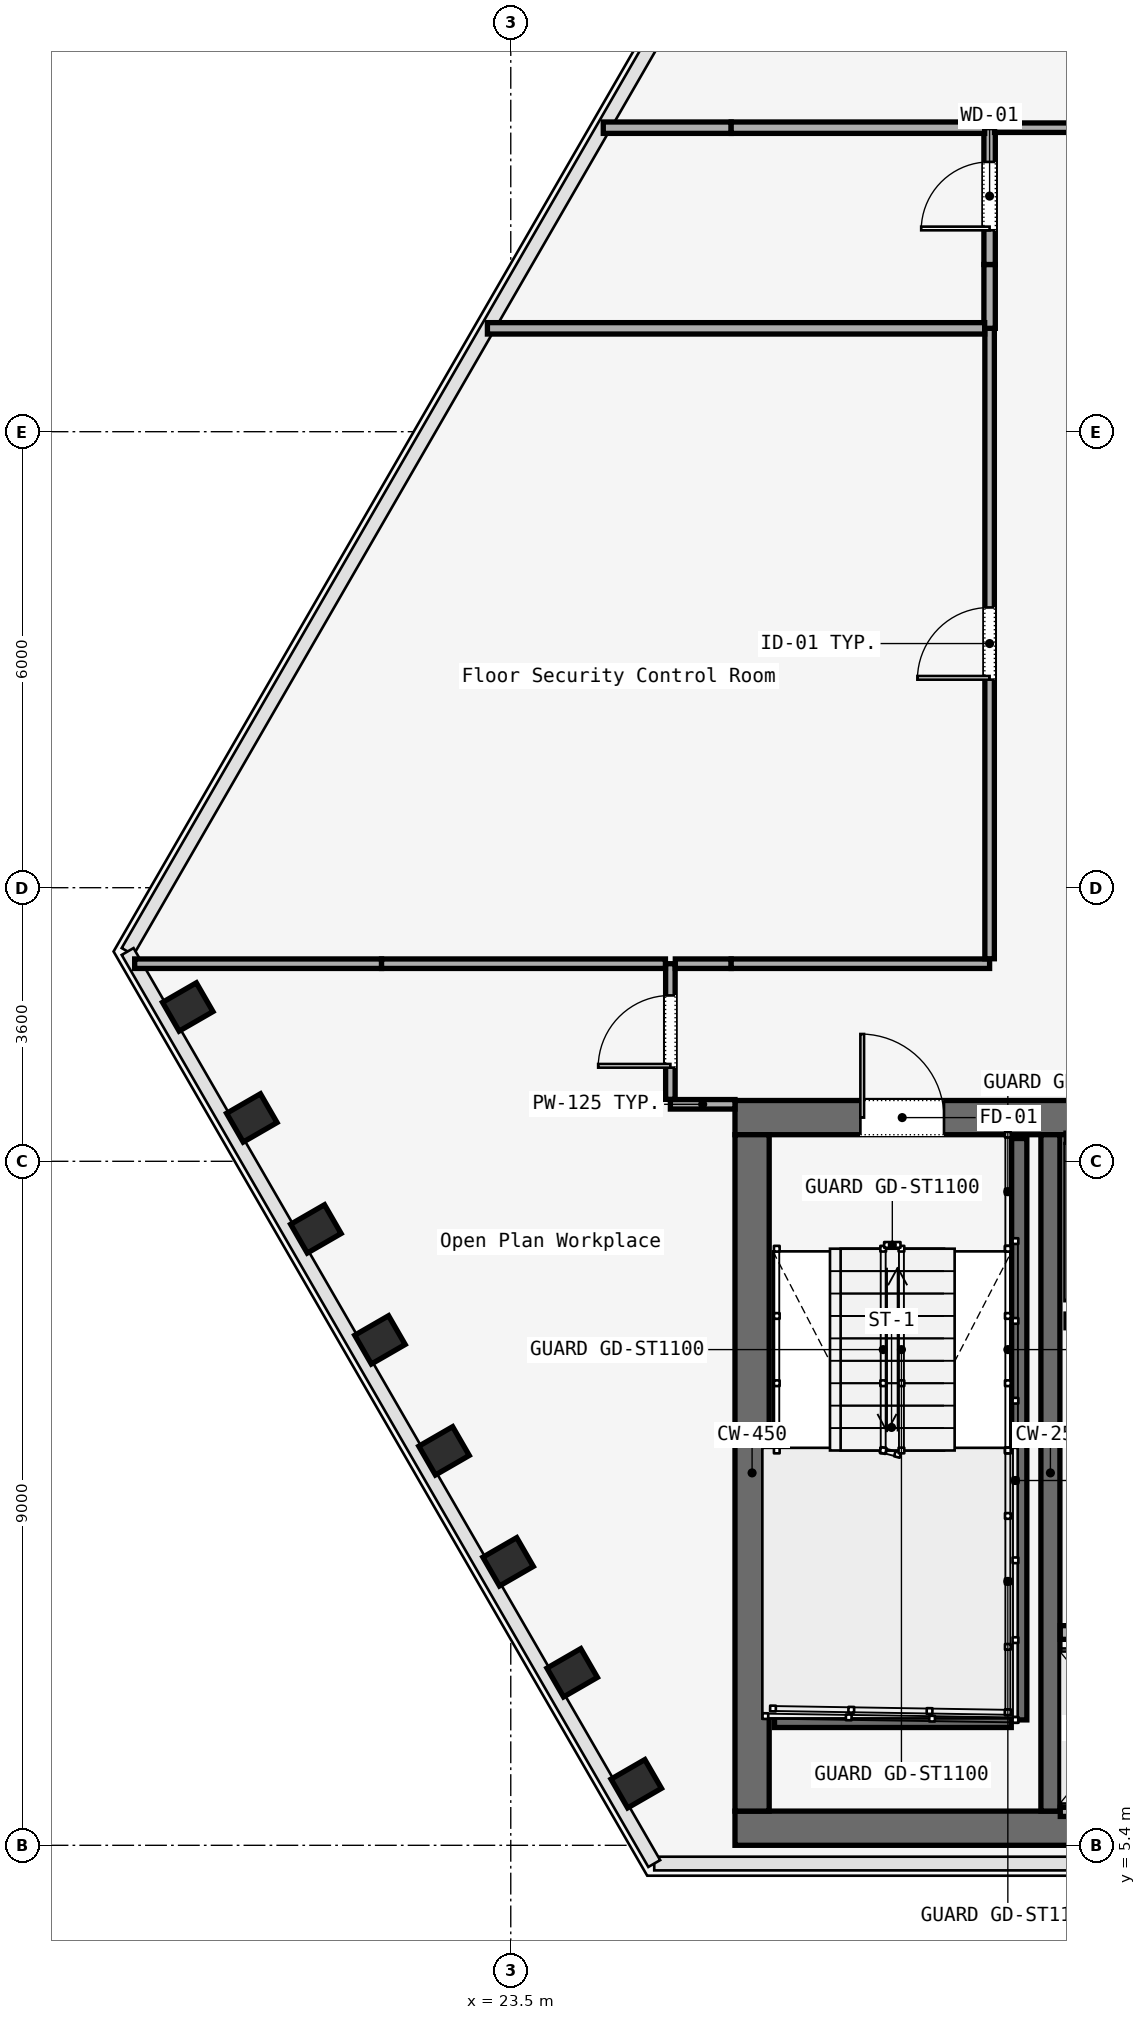
"""IFC4 building model, lengths in metres.
Left out: names, types, materials, properties, quantities, classifications, styles, units other than length and angle.
Written with IfcOpenShell. Run it as: python <this file> out.ifc"""

import sys

from ifc_helpers import new_model, si_unit, direction, frame, frame_2d, origin, origin_2d, place, context, subcontext, project, spatial, rectangle, i_section, extrude, element, fill, save


model = new_model("IFC4")
c1 = context("Model", 3, precision=1e-05, world=origin(), true_north=direction((0.0, 1.0)))
c2 = subcontext(c1, "Body", "Model", "MODEL_VIEW")
j1 = project(units=[si_unit("LENGTHUNIT", "METRE"), si_unit("PLANEANGLEUNIT", "RADIAN")], contexts=[c1])
p1 = place(None, origin())
s1 = spatial("IfcSite", under=j1, at=p1, CompositionType="ELEMENT")
p2 = place(p1, origin())
s2 = spatial("IfcBuilding", under=s1, at=p2, CompositionType="ELEMENT")
p3 = place(p2, frame((0.0, 0.0, 93.0)))
s3 = spatial("IfcBuildingStorey", under=s2, at=p3, CompositionType="ELEMENT", Elevation=93.0)
p4 = place(p3, frame((26.45, 14.975, 0.0), z_axis=(0.0, 0.0, 1.0), x_axis=(1.0, 0.0, 0.0)))
e1 = element("IfcWall", 1, at=p4, inside=s3, PredefinedType="SOLIDWALL", context=c2, shape_type="SweptSolid", body=[
    extrude(rectangle(XDim=31.1, YDim=0.45, at=frame_2d((15.55, 0.0))), origin(), (0.0, 0.0, 1.0), 3.58),
])
p5 = place(p4, frame((1.65, 0.0, 0.0)))
e2 = element("IfcOpeningElement", 2, at=p5, cuts=e1, PredefinedType="OPENING", context=c2, shape_type="SweptSolid", body=[
    extrude(rectangle(XDim=1.1, YDim=2.2, at=frame_2d((0.55, 1.1))), frame((0.0, 0.225, 0.0), z_axis=(0.0, -1.0, 0.0), x_axis=(1.0, 0.0, 0.0)), (0.0, 0.0, 1.0), 0.45),
])
p6 = place(p4, frame((13.65, 0.0, 0.0)))
e3 = element("IfcOpeningElement", 3, at=p6, cuts=e1, PredefinedType="OPENING", context=c2, shape_type="SweptSolid", body=[
    extrude(rectangle(XDim=1.1, YDim=2.2, at=frame_2d((0.55, 1.1))), frame((0.0, 0.225, 0.0), z_axis=(0.0, -1.0, 0.0), x_axis=(1.0, 0.0, 0.0)), (0.0, 0.0, 1.0), 0.45),
])
p7 = place(p4, frame((25.55, 0.0, 0.0)))
e4 = element("IfcOpeningElement", 4, at=p7, cuts=e1, PredefinedType="OPENING", context=c2, shape_type="SweptSolid", body=[
    extrude(rectangle(XDim=1.1, YDim=2.2, at=frame_2d((0.55, 1.1))), frame((0.0, 0.225, 0.0), z_axis=(0.0, -1.0, 0.0), x_axis=(1.0, 0.0, 0.0)), (0.0, 0.0, 1.0), 0.45),
])
p8 = place(p4, frame((10.7, 0.0, 0.0)))
e5 = element("IfcOpeningElement", 5, at=p8, cuts=e1, PredefinedType="OPENING", context=c2, shape_type="SweptSolid", body=[
    extrude(rectangle(XDim=1.4, YDim=2.2, at=frame_2d((0.7, 1.1))), frame((0.0, 0.225, 0.0), z_axis=(0.0, -1.0, 0.0), x_axis=(1.0, 0.0, 0.0)), (0.0, 0.0, 1.0), 0.45),
])
p9 = place(p4, frame((19.35, 0.0, 0.0)))
e6 = element("IfcOpeningElement", 6, at=p9, cuts=e1, PredefinedType="OPENING", context=c2, shape_type="SweptSolid", body=[
    extrude(rectangle(XDim=1.1, YDim=2.2, at=frame_2d((0.55, 1.1))), frame((0.0, 0.225, 0.0), z_axis=(0.0, -1.0, 0.0), x_axis=(1.0, 0.0, 0.0)), (0.0, 0.0, 1.0), 0.45),
])
p10 = place(p4, frame((21.4, 0.0, 0.0)))
e7 = element("IfcOpeningElement", 7, at=p10, cuts=e1, PredefinedType="OPENING", context=c2, shape_type="SweptSolid", body=[
    extrude(rectangle(XDim=0.9, YDim=2.1, at=frame_2d((0.45, 1.05))), frame((0.0, 0.225, 0.0), z_axis=(0.0, -1.0, 0.0), x_axis=(1.0, 0.0, 0.0)), (0.0, 0.0, 1.0), 0.45),
])
p11 = place(p4, frame((23.35, 0.0, 0.0)))
e8 = element("IfcOpeningElement", 8, at=p11, cuts=e1, PredefinedType="OPENING", context=c2, shape_type="SweptSolid", body=[
    extrude(rectangle(XDim=1.3, YDim=2.3, at=frame_2d((0.65, 1.15))), frame((0.0, 0.225, 0.0), z_axis=(0.0, -1.0, 0.0), x_axis=(1.0, 0.0, 0.0)), (0.0, 0.0, 1.0), 0.45),
])
p12 = place(p3, frame((26.45, 5.625, 0.0), z_axis=(0.0, 0.0, 1.0), x_axis=(1.0, 0.0, 0.0)))
e9 = element("IfcWall", 9, at=p12, inside=s3, PredefinedType="SOLIDWALL", context=c2, shape_type="SweptSolid", body=[
    extrude(rectangle(XDim=31.1, YDim=0.45, at=frame_2d((15.55, 0.0))), origin(), (0.0, 0.0, 1.0), 3.58),
])
p13 = place(p3, frame((26.675, 5.85, 0.0), z_axis=(0.0, 0.0, 1.0), x_axis=(0.0, 1.0, 0.0)))
e10 = element("IfcWall", 10, at=p13, inside=s3, PredefinedType="SOLIDWALL", context=c2, shape_type="SweptSolid", body=[
    extrude(rectangle(XDim=8.9, YDim=0.45, at=frame_2d((4.45, 0.0))), origin(), (0.0, 0.0, 1.0), 3.58),
])
p14 = place(p3, frame((30.6, 5.85, 0.0), z_axis=(0.0, 0.0, 1.0), x_axis=(0.0, 1.0, 0.0)))
e11 = element("IfcWall", 11, at=p14, inside=s3, PredefinedType="SOLIDWALL", context=c2, shape_type="SweptSolid", body=[
    extrude(rectangle(XDim=8.9, YDim=0.25, at=frame_2d((4.45, 0.0))), origin(), (0.0, 0.0, 1.0), 3.58),
])
for number, where, z_axis, x_axis in (
    (12, (19.25, 16.431, 0.0), (0.0, 0.0, 1.0), (-0.5, 0.866, 0.0)),
    (13, (20.093, 14.971, 0.0), (0.0, 0.0, 1.0), (-0.5, 0.866, 0.0)),
    (14, (20.936, 13.51, 0.0), (0.0, 0.0, 1.0), (-0.5, 0.866, 0.0)),
    (15, (21.779, 12.05, 0.0), (0.0, 0.0, 1.0), (-0.5, 0.866, 0.0)),
    (16, (22.622, 10.59, 0.0), (0.0, 0.0, 1.0), (-0.5, 0.866, 0.0)),
    (17, (23.465, 9.13, 0.0), (0.0, 0.0, 1.0), (-0.5, 0.866, 0.0)),
    (18, (24.308, 7.67, 0.0), (0.0, 0.0, 1.0), (-0.5, 0.866, 0.0)),
    (19, (25.151, 6.21, 0.0), (0.0, 0.0, 1.0), (-0.5, 0.866, 0.0)),
):
    element("IfcColumn", number, at=place(p3, frame(where, z_axis=z_axis, x_axis=x_axis)), inside=s3, PredefinedType="COLUMN", context=c2, shape_type="SweptSolid", body=[
        extrude(i_section(OverallWidth=0.437, OverallDepth=0.514, WebThickness=0.061, FlangeThickness=0.077, FilletRadius=0.015, at=origin_2d()), origin(), (0.0, 0.0, 1.0), 3.58),
    ])
p15 = place(p3, frame((30.19, 14.7, 0.0), z_axis=(0.0, 0.0, 1.0), x_axis=(0.0, -1.0, 0.0)))
e20 = element("IfcWall", 20, at=p15, inside=s3, PredefinedType="SOLIDWALL", context=c2, shape_type="SweptSolid", body=[
    extrude(rectangle(XDim=7.65, YDim=0.2, at=frame_2d((3.825, 0.0))), origin(), (0.0, 0.0, 1.0), 3.8),
])
p16 = place(p3, frame((26.97, 7.05, 0.0), z_axis=(0.0, 0.0, 1.0), x_axis=(1.0, 0.0, 0.0)))
e21 = element("IfcWall", 21, at=p16, inside=s3, PredefinedType="SOLIDWALL", context=c2, shape_type="SweptSolid", body=[
    extrude(rectangle(XDim=3.115, YDim=0.2, at=frame_2d((1.558, 0.0))), origin(), (0.0, 0.0, 1.0), 3.8),
])
p17 = place(p3, frame((30.73, 8.2, 0.0), z_axis=(0.0, 0.0, 1.0), x_axis=(1.0, 0.0, 0.0)))
e22 = element("IfcWall", 22, at=p17, inside=s3, PredefinedType="SOLIDWALL", context=c2, shape_type="SweptSolid", body=[
    extrude(rectangle(XDim=1.665, YDim=0.18, at=frame_2d((0.833, 0.0))), origin(), (0.0, 0.0, 1.0), 2.95),
])
p18 = place(p17, frame((0.282, 0.0, 0.0)))
e23 = element("IfcOpeningElement", 23, at=p18, cuts=e22, PredefinedType="OPENING", context=c2, shape_type="SweptSolid", body=[
    extrude(rectangle(XDim=1.1, YDim=2.2, at=frame_2d((0.55, 1.1))), frame((0.0, 0.09, 0.0), z_axis=(0.0, -1.0, 0.0), x_axis=(1.0, 0.0, 0.0)), (0.0, 0.0, 1.0), 0.18),
])
p19 = place(p3, frame((30.73, 5.84, 0.0), z_axis=(0.0, 0.0, 1.0), x_axis=(1.0, 0.0, 0.0)))
e24 = element("IfcWall", 24, at=p19, inside=s3, PredefinedType="SOLIDWALL", context=c2, shape_type="SweptSolid", body=[
    extrude(rectangle(XDim=1.665, YDim=0.12, at=frame_2d((0.833, 0.0))), origin(), (0.0, 0.0, 1.0), 2.95),
])
p20 = place(p3, frame((26.45, 15.15, 0.0), z_axis=(0.0, 0.0, 1.0), x_axis=(-1.0, 0.0, 0.0)))
e25 = element("IfcWall", 25, at=p20, inside=s3, PredefinedType="PARTITIONING", context=c2, shape_type="SweptSolid", body=[
    extrude(rectangle(XDim=0.85, YDim=0.125, at=frame_2d((0.425, 0.0))), origin(), (0.0, 0.0, 1.0), 2.95),
])
p21 = place(p3, frame((25.6, 15.215, 0.0), z_axis=(0.0, 0.0, 1.0), x_axis=(0.0, 1.0, 0.0)))
e26 = element("IfcWall", 26, at=p21, inside=s3, PredefinedType="PARTITIONING", context=c2, shape_type="SweptSolid", body=[
    extrude(rectangle(XDim=1.785, YDim=0.125, at=frame_2d((0.893, 0.0))), origin(), (0.0, 0.0, 1.0), 2.95),
])
p22 = place(p21, frame((0.417, 0.0, 0.0)))
e27 = element("IfcOpeningElement", 27, at=p22, cuts=e26, PredefinedType="OPENING", context=c2, shape_type="SweptSolid", body=[
    extrude(rectangle(XDim=0.95, YDim=2.2, at=frame_2d((0.475, 1.1))), frame((0.0, 0.062, 0.0), z_axis=(0.0, -1.0, 0.0), x_axis=(1.0, 0.0, 0.0)), (0.0, 0.0, 1.0), 0.125),
])
p23 = place(p3, frame((25.665, 17.0, 0.0), z_axis=(0.0, 0.0, 1.0), x_axis=(1.0, 0.0, 0.0)))
e28 = element("IfcWall", 28, at=p23, inside=s3, PredefinedType="PARTITIONING", context=c2, shape_type="SweptSolid", body=[
    extrude(rectangle(XDim=0.735, YDim=0.125, at=frame_2d((0.367, 0.0))), origin(), (0.0, 0.0, 1.0), 2.95),
])
p24 = place(p3, frame((26.4, 17.0, 0.0), z_axis=(0.0, 0.0, 1.0), x_axis=(1.0, 0.0, 0.0)))
e29 = element("IfcWall", 29, at=p24, inside=s3, PredefinedType="PARTITIONING", context=c2, shape_type="SweptSolid", body=[
    extrude(rectangle(XDim=3.4, YDim=0.125, at=frame_2d((1.7, 0.0))), origin(), (0.0, 0.0, 1.0), 2.95),
])
p25 = place(p3, frame((29.8, 17.065, 0.0), z_axis=(0.0, 0.0, 1.0), x_axis=(0.0, 1.0, 0.0)))
e30 = element("IfcWall", 30, at=p25, inside=s3, PredefinedType="PARTITIONING", context=c2, shape_type="SweptSolid", body=[
    extrude(rectangle(XDim=8.295, YDim=0.125, at=frame_2d((4.147, 0.0))), origin(), (0.0, 0.0, 1.0), 2.95),
])
p26 = place(p25, frame((3.673, 0.0, 0.0)))
e31 = element("IfcOpeningElement", 31, at=p26, cuts=e30, PredefinedType="OPENING", context=c2, shape_type="SweptSolid", body=[
    extrude(rectangle(XDim=0.95, YDim=2.2, at=frame_2d((0.475, 1.1))), frame((0.0, 0.062, 0.0), z_axis=(0.0, -1.0, 0.0), x_axis=(1.0, 0.0, 0.0)), (0.0, 0.0, 1.0), 0.125),
])
p27 = place(p3, frame((29.8, 25.36, 0.0), z_axis=(0.0, 0.0, 1.0), x_axis=(0.0, 1.0, 0.0)))
e32 = element("IfcWall", 32, at=p27, inside=s3, PredefinedType="PARTITIONING", context=c2, shape_type="SweptSolid", body=[
    extrude(rectangle(XDim=0.84, YDim=0.15, at=frame_2d((0.42, 0.0))), origin(), (0.0, 0.0, 1.0), 2.95),
])
p28 = place(p3, frame((29.8, 26.2, 0.0), z_axis=(0.0, 0.0, 1.0), x_axis=(0.0, 1.0, 0.0)))
e33 = element("IfcWall", 33, at=p28, inside=s3, PredefinedType="PARTITIONING", context=c2, shape_type="SweptSolid", body=[
    extrude(rectangle(XDim=1.8, YDim=0.15, at=frame_2d((0.9, 0.0))), origin(), (0.0, 0.0, 1.0), 2.95),
])
p29 = place(p28, frame((0.45, 0.0, 0.0)))
e34 = element("IfcOpeningElement", 34, at=p29, cuts=e33, PredefinedType="OPENING", context=c2, shape_type="SweptSolid", body=[
    extrude(rectangle(XDim=0.9, YDim=2.15, at=frame_2d((0.45, 1.075))), frame((0.0, 0.075, 0.0), z_axis=(0.0, -1.0, 0.0), x_axis=(1.0, 0.0, 0.0)), (0.0, 0.0, 1.0), 0.15),
])
p30 = place(p3, frame((29.865, 28.0, 0.0), z_axis=(0.0, 0.0, 1.0), x_axis=(1.0, 0.0, 0.0)))
e35 = element("IfcWall", 35, at=p30, inside=s3, PredefinedType="PARTITIONING", context=c2, shape_type="SweptSolid", body=[
    extrude(rectangle(XDim=1.735, YDim=0.125, at=frame_2d((0.868, 0.0))), origin(), (0.0, 0.0, 1.0), 2.95),
])
p31 = place(p3, frame((18.552, 17.0, 0.0), z_axis=(0.0, 0.0, 1.0), x_axis=(1.0, 0.0, 0.0)))
e36 = element("IfcWall", 36, at=p31, inside=s3, PredefinedType="PARTITIONING", context=c2, shape_type="SweptSolid", body=[
    extrude(rectangle(XDim=3.248, YDim=0.125, at=frame_2d((1.624, 0.0))), origin(), (0.0, 0.0, 1.0), 2.95),
])
p32 = place(p3, frame((21.8, 17.0, 0.0), z_axis=(0.0, 0.0, 1.0), x_axis=(1.0, 0.0, 0.0)))
e37 = element("IfcWall", 37, at=p32, inside=s3, PredefinedType="PARTITIONING", context=c2, shape_type="SweptSolid", body=[
    extrude(rectangle(XDim=3.735, YDim=0.125, at=frame_2d((1.867, 0.0))), origin(), (0.0, 0.0, 1.0), 2.95),
])
p33 = place(p3, frame((23.193, 25.36, 0.0), z_axis=(0.0, 0.0, 1.0), x_axis=(1.0, 0.0, 0.0)))
e38 = element("IfcWall", 38, at=p33, inside=s3, PredefinedType="PARTITIONING", context=c2, shape_type="SweptSolid", body=[
    extrude(rectangle(XDim=6.542, YDim=0.15, at=frame_2d((3.271, 0.0))), origin(), (0.0, 0.0, 1.0), 2.95),
])
p34 = place(p3, frame((24.717, 28.0, 0.0), z_axis=(0.0, 0.0, 1.0), x_axis=(1.0, 0.0, 0.0)))
e39 = element("IfcWall", 39, at=p34, inside=s3, PredefinedType="PARTITIONING", context=c2, shape_type="SweptSolid", body=[
    extrude(rectangle(XDim=1.683, YDim=0.15, at=frame_2d((0.841, 0.0))), origin(), (0.0, 0.0, 1.0), 2.95),
])
p35 = place(p3, frame((26.4, 28.0, 0.0), z_axis=(0.0, 0.0, 1.0), x_axis=(1.0, 0.0, 0.0)))
e40 = element("IfcWall", 40, at=p35, inside=s3, PredefinedType="PARTITIONING", context=c2, shape_type="SweptSolid", body=[
    extrude(rectangle(XDim=3.335, YDim=0.15, at=frame_2d((1.667, 0.0))), origin(), (0.0, 0.0, 1.0), 2.95),
])
p36 = place(p5, origin())
e41 = element("IfcDoor", 41, at=p36, inside=s3, OperationType="SINGLE_SWING_RIGHT", PredefinedType="DOOR", context=c2, shape_type="SweptSolid", body=[
    extrude(rectangle(XDim=1.1, YDim=2.2, at=frame_2d((0.55, 1.1))), frame((0.0, 0.025, 0.0), z_axis=(0.0, -1.0, 0.0), x_axis=(1.0, 0.0, 0.0)), (0.0, 0.0, 1.0), 0.05),
])
fill(e2, e41)
p37 = place(p22, origin())
e42 = element("IfcDoor", 42, at=p37, inside=s3, OperationType="SINGLE_SWING_RIGHT", PredefinedType="DOOR", context=c2, shape_type="SweptSolid", body=[
    extrude(rectangle(XDim=0.95, YDim=2.2, at=frame_2d((0.475, 1.1))), frame((0.0, 0.025, 0.0), z_axis=(0.0, -1.0, 0.0), x_axis=(1.0, 0.0, 0.0)), (0.0, 0.0, 1.0), 0.05),
])
fill(e27, e42)
p38 = place(p26, origin())
e43 = element("IfcDoor", 43, at=p38, inside=s3, OperationType="SINGLE_SWING_RIGHT", PredefinedType="DOOR", context=c2, shape_type="SweptSolid", body=[
    extrude(rectangle(XDim=0.95, YDim=2.2, at=frame_2d((0.475, 1.1))), frame((0.0, 0.025, 0.0), z_axis=(0.0, -1.0, 0.0), x_axis=(1.0, 0.0, 0.0)), (0.0, 0.0, 1.0), 0.05),
])
fill(e31, e43)
p39 = place(p29, origin())
e44 = element("IfcDoor", 44, at=p39, inside=s3, OperationType="SINGLE_SWING_RIGHT", PredefinedType="DOOR", context=c2, shape_type="SweptSolid", body=[
    extrude(rectangle(XDim=0.9, YDim=2.15, at=frame_2d((0.45, 1.075))), frame((0.0, 0.025, 0.0), z_axis=(0.0, -1.0, 0.0), x_axis=(1.0, 0.0, 0.0)), (0.0, 0.0, 1.0), 0.05),
])
fill(e34, e44)
save(model, sys.argv[1])
